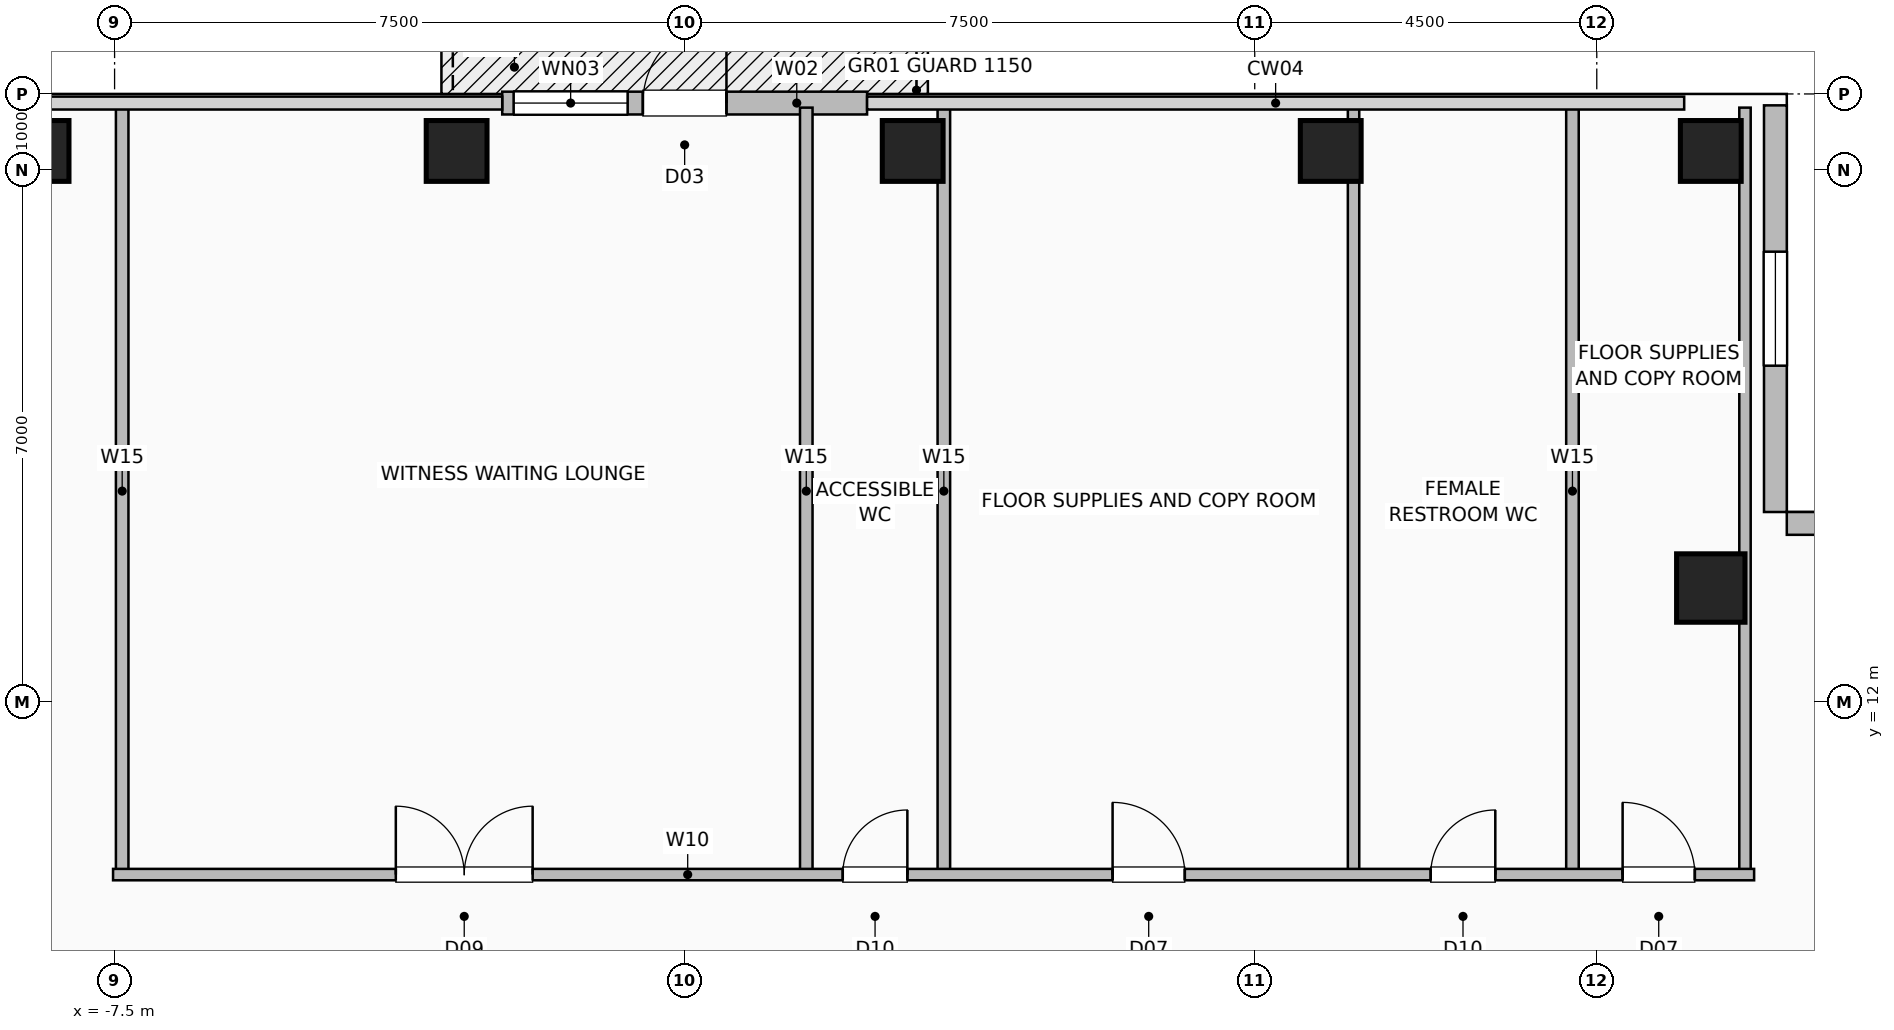
"""IFC4 building model, lengths in metres.
Left out: names, types, materials, properties, quantities, classifications, styles, units other than length and angle.
Written with IfcOpenShell. Run it as: python <this file> out.ifc"""

import sys

from ifc_helpers import new_model, si_unit, direction, frame, frame_2d, origin, origin_2d, place, context, subcontext, project, spatial, rectangle, hollow_rectangle, extrude, element, fill, save


model = new_model("IFC4")
c1 = context("Model", 3, precision=1e-05, world=origin(), true_north=direction((0.0, 1.0)))
c2 = subcontext(c1, "Body", "Model", "MODEL_VIEW")
j1 = project(units=[si_unit("LENGTHUNIT", "METRE"), si_unit("PLANEANGLEUNIT", "RADIAN")], contexts=[c1])
p1 = place(None, origin())
s1 = spatial("IfcSite", under=j1, at=p1, CompositionType="ELEMENT")
p2 = place(p1, origin())
s2 = spatial("IfcBuilding", under=s1, at=p2, CompositionType="ELEMENT")
p3 = place(p2, frame((0.0, 0.0, 187.8)))
s3 = spatial("IfcBuildingStorey", under=s2, at=p3, CompositionType="ELEMENT", Elevation=187.8)
for number, where, z_axis, x_axis in (
    (1, (-8.5, 19.25, 0.0), (0.0, 0.0, 1.0), (1.0, 0.0, 0.0)),
    (2, (-3.0, 19.25, 0.0), (0.0, 0.0, 1.0), (1.0, 0.0, 0.0)),
    (3, (3.0, 19.25, 0.0), (0.0, 0.0, 1.0), (1.0, 0.0, 0.0)),
    (4, (8.5, 19.25, 0.0), (0.0, 0.0, 1.0), (1.0, 0.0, 0.0)),
    (5, (13.5, 19.25, 0.0), (0.0, 0.0, 1.0), (1.0, 0.0, 0.0)),
):
    element("IfcColumn", number, at=place(p3, frame(where, z_axis=z_axis, x_axis=x_axis)), inside=s3, PredefinedType="COLUMN", context=c2, shape_type="SweptSolid", body=[
        extrude(hollow_rectangle(XDim=0.8, YDim=0.8, WallThickness=0.04, at=origin_2d()), origin(), (0.0, 0.0, 1.0), 3.6),
    ])
p4 = place(p3, frame((13.5, 13.5, 0.0), z_axis=(0.0, 0.0, 1.0), x_axis=(1.0, 0.0, 0.0)))
e6 = element("IfcColumn", 6, at=p4, inside=s3, PredefinedType="COLUMN", context=c2, shape_type="SweptSolid", body=[
    extrude(hollow_rectangle(XDim=0.9, YDim=0.9, WallThickness=0.045, at=origin_2d()), origin(), (0.0, 0.0, 1.0), 3.6),
])
p5 = place(p3, frame((-2.4, 19.88, 0.0), z_axis=(0.0, 0.0, 1.0), x_axis=(1.0, 0.0, 0.0)))
e7 = element("IfcWall", 7, at=p5, inside=s3, PredefinedType="SOLIDWALL", context=c2, shape_type="SweptSolid", body=[
    extrude(rectangle(XDim=4.8, YDim=0.3, at=frame_2d((2.4, 0.0))), origin(), (0.0, 0.0, 1.0), 3.36),
])
p6 = place(p5, frame((1.85, 0.0, 0.0)))
e8 = element("IfcOpeningElement", 8, at=p6, cuts=e7, PredefinedType="OPENING", context=c2, shape_type="SweptSolid", body=[
    extrude(rectangle(XDim=1.1, YDim=2.2, at=frame_2d((0.55, 1.1))), frame((0.0, 0.16, 0.0), z_axis=(0.0, -1.0, 0.0), x_axis=(1.0, 0.0, 0.0)), (0.0, 0.0, 1.0), 0.32),
])
p7 = place(p5, frame((0.15, 0.0, 0.85)))
e9 = element("IfcOpeningElement", 9, at=p7, cuts=e7, PredefinedType="OPENING", context=c2, shape_type="SweptSolid", body=[
    extrude(rectangle(XDim=1.5, YDim=1.8, at=frame_2d((0.75, 0.9))), frame((0.0, 0.16, 0.0), z_axis=(0.0, -1.0, 0.0), x_axis=(1.0, 0.0, 0.0)), (0.0, 0.0, 1.0), 0.32),
])
p8 = place(p3, frame((14.35, 19.85, 0.0), z_axis=(0.0, 0.0, 1.0), x_axis=(0.0, -1.0, 0.0)))
e10 = element("IfcWall", 10, at=p8, inside=s3, PredefinedType="SOLIDWALL", context=c2, shape_type="SweptSolid", body=[
    extrude(rectangle(XDim=5.35, YDim=0.3, at=frame_2d((2.675, 0.0))), origin(), (0.0, 0.0, 1.0), 3.36),
])
p9 = place(p8, frame((1.925, 0.0, 0.9)))
e11 = element("IfcOpeningElement", 11, at=p9, cuts=e10, PredefinedType="OPENING", context=c2, shape_type="SweptSolid", body=[
    extrude(rectangle(XDim=1.5, YDim=1.8, at=frame_2d((0.75, 0.9))), frame((0.0, 0.16, 0.0), z_axis=(0.0, -1.0, 0.0), x_axis=(1.0, 0.0, 0.0)), (0.0, 0.0, 1.0), 0.32),
])
p10 = place(p3, frame((19.85, 14.35, 0.0), z_axis=(0.0, 0.0, 1.0), x_axis=(-1.0, 0.0, 0.0)))
e12 = element("IfcWall", 12, at=p10, inside=s3, PredefinedType="SOLIDWALL", context=c2, shape_type="SweptSolid", body=[
    extrude(rectangle(XDim=5.35, YDim=0.3, at=frame_2d((2.675, 0.0))), origin(), (0.0, 0.0, 1.0), 3.36),
])
for number, where, z_axis, x_axis in (
    (13, (3.41, 9.73, 0.0), (0.0, 0.0, 1.0), (0.0, 1.0, 0.0)),
    (14, (11.68, 9.73, 0.0), (0.0, 0.0, 1.0), (0.0, 1.0, 0.0)),
    (15, (-7.4, 9.73, 0.0), (0.0, 0.0, 1.0), (0.0, 1.0, 0.0)),
    (16, (1.6, 9.73, 0.0), (0.0, 0.0, 1.0), (0.0, 1.0, 0.0)),
):
    element("IfcWall", number, at=place(p3, frame(where, z_axis=z_axis, x_axis=x_axis)), inside=s3, PredefinedType="PLUMBINGWALL", context=c2, shape_type="SweptSolid", body=[
        extrude(rectangle(XDim=10.09, YDim=0.165, at=frame_2d((5.045, 0.0))), origin(), (0.0, 0.0, 1.0), 3.36),
    ])
for number, where, z_axis, x_axis in (
    (17, (8.8, 9.73, 0.0), (0.0, 0.0, 1.0), (0.0, 1.0, 0.0)),
    (18, (13.95, 9.73, 0.0), (0.0, 0.0, 1.0), (0.0, 1.0, 0.0)),
):
    element("IfcWall", number, at=place(p3, frame(where, z_axis=z_axis, x_axis=x_axis)), inside=s3, PredefinedType="PARTITIONING", context=c2, shape_type="SweptSolid", body=[
        extrude(rectangle(XDim=10.09, YDim=0.15, at=frame_2d((5.045, 0.0))), origin(), (0.0, 0.0, 1.0), 3.36),
    ])
p11 = place(p3, frame((-7.52, 9.73, 0.0), z_axis=(0.0, 0.0, 1.0), x_axis=(1.0, 0.0, 0.0)))
e19 = element("IfcWall", 19, at=p11, inside=s3, PredefinedType="PARTITIONING", context=c2, shape_type="SweptSolid", body=[
    extrude(rectangle(XDim=21.59, YDim=0.15, at=frame_2d((10.795, 0.0))), origin(), (0.0, 0.0, 1.0), 3.36),
])
p12 = place(p11, frame((3.72, 0.0, 0.0)))
e20 = element("IfcOpeningElement", 20, at=p12, cuts=e19, PredefinedType="OPENING", context=c2, shape_type="SweptSolid", body=[
    extrude(rectangle(XDim=1.8, YDim=2.08, at=frame_2d((0.9, 1.04))), frame((0.0, 0.085, 0.0), z_axis=(0.0, -1.0, 0.0), x_axis=(1.0, 0.0, 0.0)), (0.0, 0.0, 1.0), 0.17),
])
p13 = place(p11, frame((9.6, 0.0, 0.0)))
e21 = element("IfcOpeningElement", 21, at=p13, cuts=e19, PredefinedType="OPENING", context=c2, shape_type="SweptSolid", body=[
    extrude(rectangle(XDim=0.85, YDim=2.05, at=frame_2d((0.425, 1.025))), frame((0.0, 0.085, 0.0), z_axis=(0.0, -1.0, 0.0), x_axis=(1.0, 0.0, 0.0)), (0.0, 0.0, 1.0), 0.17),
])
p14 = place(p11, frame((13.15, 0.0, 0.0)))
e22 = element("IfcOpeningElement", 22, at=p14, cuts=e19, PredefinedType="OPENING", context=c2, shape_type="SweptSolid", body=[
    extrude(rectangle(XDim=0.95, YDim=2.06, at=frame_2d((0.475, 1.03))), frame((0.0, 0.085, 0.0), z_axis=(0.0, -1.0, 0.0), x_axis=(1.0, 0.0, 0.0)), (0.0, 0.0, 1.0), 0.17),
])
p15 = place(p11, frame((17.335, 0.0, 0.0)))
e23 = element("IfcOpeningElement", 23, at=p15, cuts=e19, PredefinedType="OPENING", context=c2, shape_type="SweptSolid", body=[
    extrude(rectangle(XDim=0.85, YDim=2.05, at=frame_2d((0.425, 1.025))), frame((0.0, 0.085, 0.0), z_axis=(0.0, -1.0, 0.0), x_axis=(1.0, 0.0, 0.0)), (0.0, 0.0, 1.0), 0.17),
])
p16 = place(p11, frame((19.86, 0.0, 0.0)))
e24 = element("IfcOpeningElement", 24, at=p16, cuts=e19, PredefinedType="OPENING", context=c2, shape_type="SweptSolid", body=[
    extrude(rectangle(XDim=0.95, YDim=2.06, at=frame_2d((0.475, 1.03))), frame((0.0, 0.085, 0.0), z_axis=(0.0, -1.0, 0.0), x_axis=(1.0, 0.0, 0.0)), (0.0, 0.0, 1.0), 0.17),
])
p17 = place(p6, origin())
e25 = element("IfcDoor", 25, at=p17, inside=s3, OperationType="SINGLE_SWING_RIGHT", PredefinedType="DOOR", context=c2, shape_type="SweptSolid", body=[
    extrude(rectangle(XDim=1.1, YDim=2.2, at=frame_2d((0.55, 1.1))), frame((0.0, 0.025, 0.0), z_axis=(0.0, -1.0, 0.0), x_axis=(1.0, 0.0, 0.0)), (0.0, 0.0, 1.0), 0.05),
])
fill(e8, e25)
p18 = place(p7, origin())
e26 = element("IfcWindow", 26, at=p18, inside=s3, PartitioningType="SINGLE_PANEL", PredefinedType="WINDOW", context=c2, shape_type="SweptSolid", body=[
    extrude(rectangle(XDim=1.5, YDim=1.8, at=frame_2d((0.75, 0.9))), frame((0.0, 0.03, 0.0), z_axis=(0.0, -1.0, 0.0), x_axis=(1.0, 0.0, 0.0)), (0.0, 0.0, 1.0), 0.06),
])
fill(e9, e26)
p19 = place(p9, origin())
e27 = element("IfcWindow", 27, at=p19, inside=s3, PartitioningType="SINGLE_PANEL", PredefinedType="WINDOW", context=c2, shape_type="SweptSolid", body=[
    extrude(rectangle(XDim=1.5, YDim=1.8, at=frame_2d((0.75, 0.9))), frame((0.0, 0.03, 0.0), z_axis=(0.0, -1.0, 0.0), x_axis=(1.0, 0.0, 0.0)), (0.0, 0.0, 1.0), 0.06),
])
fill(e11, e27)
p20 = place(p12, origin())
e28 = element("IfcDoor", 28, at=p20, inside=s3, OperationType="DOUBLE_DOOR_SINGLE_SWING", PredefinedType="DOOR", context=c2, shape_type="SweptSolid", body=[
    extrude(rectangle(XDim=1.8, YDim=2.08, at=frame_2d((0.9, 1.04))), frame((0.0, 0.025, 0.0), z_axis=(0.0, -1.0, 0.0), x_axis=(1.0, 0.0, 0.0)), (0.0, 0.0, 1.0), 0.05),
])
fill(e20, e28)
p21 = place(p13, origin())
e29 = element("IfcDoor", 29, at=p21, inside=s3, OperationType="SINGLE_SWING_RIGHT", PredefinedType="DOOR", context=c2, shape_type="SweptSolid", body=[
    extrude(rectangle(XDim=0.85, YDim=2.05, at=frame_2d((0.425, 1.025))), frame((0.0, 0.025, 0.0), z_axis=(0.0, -1.0, 0.0), x_axis=(1.0, 0.0, 0.0)), (0.0, 0.0, 1.0), 0.05),
])
fill(e21, e29)
p22 = place(p14, origin())
e30 = element("IfcDoor", 30, at=p22, inside=s3, OperationType="SINGLE_SWING_LEFT", PredefinedType="DOOR", context=c2, shape_type="SweptSolid", body=[
    extrude(rectangle(XDim=0.95, YDim=2.06, at=frame_2d((0.475, 1.03))), frame((0.0, 0.025, 0.0), z_axis=(0.0, -1.0, 0.0), x_axis=(1.0, 0.0, 0.0)), (0.0, 0.0, 1.0), 0.05),
])
fill(e22, e30)
p23 = place(p15, origin())
e31 = element("IfcDoor", 31, at=p23, inside=s3, OperationType="SINGLE_SWING_RIGHT", PredefinedType="DOOR", context=c2, shape_type="SweptSolid", body=[
    extrude(rectangle(XDim=0.85, YDim=2.05, at=frame_2d((0.425, 1.025))), frame((0.0, 0.025, 0.0), z_axis=(0.0, -1.0, 0.0), x_axis=(1.0, 0.0, 0.0)), (0.0, 0.0, 1.0), 0.05),
])
fill(e23, e31)
p24 = place(p16, origin())
e32 = element("IfcDoor", 32, at=p24, inside=s3, OperationType="SINGLE_SWING_LEFT", PredefinedType="DOOR", context=c2, shape_type="SweptSolid", body=[
    extrude(rectangle(XDim=0.95, YDim=2.06, at=frame_2d((0.475, 1.03))), frame((0.0, 0.025, 0.0), z_axis=(0.0, -1.0, 0.0), x_axis=(1.0, 0.0, 0.0)), (0.0, 0.0, 1.0), 0.05),
])
fill(e24, e32)
save(model, sys.argv[1])
